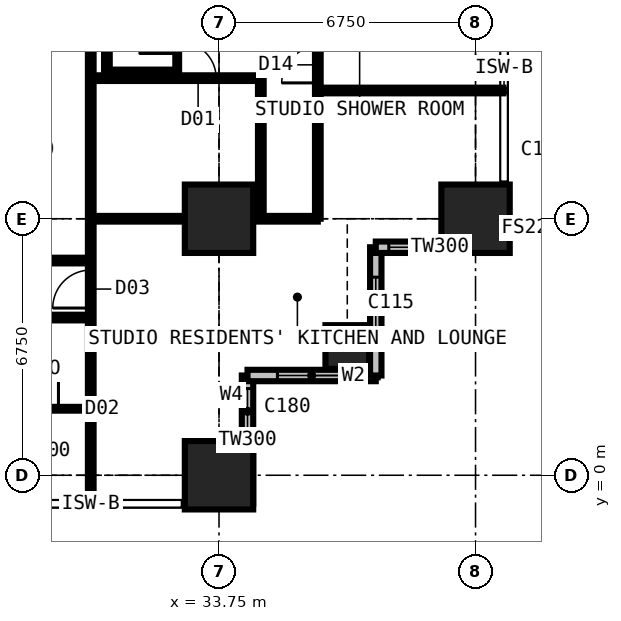
"""IFC4 building model, lengths in metres.
Left out: names, types, materials, properties, quantities, classifications, styles, units other than length and angle.
Written with IfcOpenShell. Run it as: python <this file> out.ifc"""

import sys

from ifc_helpers import new_model, si_unit, direction, frame, frame_2d, origin, origin_2d, place, context, subcontext, project, spatial, rectangle, extrude, element, fill, save


model = new_model("IFC4")
c1 = context("Model", 3, precision=1e-05, world=origin(), true_north=direction((0.0, 1.0)))
c2 = subcontext(c1, "Body", "Model", "MODEL_VIEW")
j1 = project(units=[si_unit("LENGTHUNIT", "METRE"), si_unit("PLANEANGLEUNIT", "RADIAN")], contexts=[c1])
p1 = place(None, origin())
s1 = spatial("IfcSite", under=j1, at=p1, CompositionType="ELEMENT")
p2 = place(p1, origin())
s2 = spatial("IfcBuilding", under=s1, at=p2, CompositionType="ELEMENT")
p3 = place(p2, frame((0.0, 0.0, 98.1)))
s3 = spatial("IfcBuildingStorey", under=s2, at=p3, CompositionType="ELEMENT", Elevation=98.1)
for number, where, z_axis, x_axis in (
    (1, (33.75, 0.0, 0.0), (0.0, 0.0, 1.0), (1.0, 0.0, 0.0)),
    (2, (33.75, 6.75, 0.0), (0.0, 0.0, 1.0), (1.0, 0.0, 0.0)),
):
    element("IfcColumn", number, at=place(p3, frame(where, z_axis=z_axis, x_axis=x_axis)), inside=s3, PredefinedType="COLUMN", context=c2, shape_type="SweptSolid", body=[
        extrude(rectangle(XDim=1.8, YDim=1.8, at=origin_2d()), origin(), (0.0, 0.0, 1.0), 3.6),
    ])
p4 = place(p3, frame((37.125, 3.375, 0.0), z_axis=(0.0, 0.0, 1.0), x_axis=(1.0, 0.0, 0.0)))
e3 = element("IfcColumn", 3, at=p4, inside=s3, PredefinedType="COLUMN", context=c2, shape_type="SweptSolid", body=[
    extrude(rectangle(XDim=1.15, YDim=1.15, at=origin_2d()), origin(), (0.0, 0.0, 1.0), 3.6),
])
p5 = place(p3, frame((40.5, 6.75, 0.0), z_axis=(0.0, 0.0, 1.0), x_axis=(1.0, 0.0, 0.0)))
e4 = element("IfcColumn", 4, at=p5, inside=s3, PredefinedType="COLUMN", context=c2, shape_type="SweptSolid", body=[
    extrude(rectangle(XDim=1.8, YDim=1.8, at=origin_2d()), origin(), (0.0, 0.0, 1.0), 3.6),
])
p6 = place(p3, frame((34.5, -0.75, 0.0), z_axis=(0.0, 0.0, 1.0), x_axis=(0.0, 1.0, 0.0)))
e5 = element("IfcWall", 5, at=p6, inside=s3, PredefinedType="SOLIDWALL", context=c2, shape_type="SweptSolid", body=[
    extrude(rectangle(XDim=3.375, YDim=0.3, at=frame_2d((1.688, 0.0))), origin(), (0.0, 0.0, 1.0), 3.375),
])
p7 = place(p6, frame((1.833, 0.0, 0.9)))
e6 = element("IfcOpeningElement", 6, at=p7, cuts=e5, PredefinedType="OPENING", context=c2, shape_type="SweptSolid", body=[
    extrude(rectangle(XDim=1.2, YDim=1.8, at=frame_2d((0.6, 0.9))), frame((0.0, 0.16, 0.0), z_axis=(0.0, -1.0, 0.0), x_axis=(1.0, 0.0, 0.0)), (0.0, 0.0, 1.0), 0.32),
])
p8 = place(p3, frame((34.5, 2.625, 0.0), z_axis=(0.0, 0.0, 1.0), x_axis=(1.0, 0.0, 0.0)))
e7 = element("IfcWall", 7, at=p8, inside=s3, PredefinedType="SOLIDWALL", context=c2, shape_type="SweptSolid", body=[
    extrude(rectangle(XDim=3.375, YDim=0.3, at=frame_2d((1.688, 0.0))), origin(), (0.0, 0.0, 1.0), 3.375),
])
p9 = place(p8, frame((0.788, 0.0, 0.6)))
e8 = element("IfcOpeningElement", 8, at=p9, cuts=e7, PredefinedType="OPENING", context=c2, shape_type="SweptSolid", body=[
    extrude(rectangle(XDim=1.8, YDim=2.1, at=frame_2d((0.9, 1.05))), frame((0.0, 0.16, 0.0), z_axis=(0.0, -1.0, 0.0), x_axis=(1.0, 0.0, 0.0)), (0.0, 0.0, 1.0), 0.32),
])
p10 = place(p3, frame((37.875, 2.625, 0.0), z_axis=(0.0, 0.0, 1.0), x_axis=(0.0, 1.0, 0.0)))
e9 = element("IfcWall", 9, at=p10, inside=s3, PredefinedType="SOLIDWALL", context=c2, shape_type="SweptSolid", body=[
    extrude(rectangle(XDim=3.375, YDim=0.3, at=frame_2d((1.688, 0.0))), origin(), (0.0, 0.0, 1.0), 3.375),
])
p11 = place(p10, frame((0.788, 0.0, 0.6)))
e10 = element("IfcOpeningElement", 10, at=p11, cuts=e9, PredefinedType="OPENING", context=c2, shape_type="SweptSolid", body=[
    extrude(rectangle(XDim=1.8, YDim=2.1, at=frame_2d((0.9, 1.05))), frame((0.0, 0.16, 0.0), z_axis=(0.0, -1.0, 0.0), x_axis=(1.0, 0.0, 0.0)), (0.0, 0.0, 1.0), 0.32),
])
p12 = place(p3, frame((37.875, 6.0, 0.0), z_axis=(0.0, 0.0, 1.0), x_axis=(1.0, 0.0, 0.0)))
e11 = element("IfcWall", 11, at=p12, inside=s3, PredefinedType="SOLIDWALL", context=c2, shape_type="SweptSolid", body=[
    extrude(rectangle(XDim=3.375, YDim=0.3, at=frame_2d((1.688, 0.0))), origin(), (0.0, 0.0, 1.0), 3.375),
])
p13 = place(p12, frame((0.343, 0.0, 0.9)))
e12 = element("IfcOpeningElement", 12, at=p13, cuts=e11, PredefinedType="OPENING", context=c2, shape_type="SweptSolid", body=[
    extrude(rectangle(XDim=1.2, YDim=1.8, at=frame_2d((0.6, 0.9))), frame((0.0, 0.16, 0.0), z_axis=(0.0, -1.0, 0.0), x_axis=(1.0, 0.0, 0.0)), (0.0, 0.0, 1.0), 0.32),
])
p14 = place(p3, frame((6.75, 4.15, 0.0), z_axis=(0.0, 0.0, 1.0), x_axis=(1.0, 0.0, 0.0)))
e13 = element("IfcWall", 13, at=p14, inside=s3, PredefinedType="PARTITIONING", context=c2, shape_type="SweptSolid", body=[
    extrude(rectangle(XDim=23.625, YDim=0.15, at=frame_2d((11.812, 0.0))), origin(), (0.0, 0.0, 1.0), 3.375),
])
p15 = place(p14, frame((1.2, 0.0, 0.0)))
e14 = element("IfcOpeningElement", 14, at=p15, cuts=e13, PredefinedType="OPENING", context=c2, shape_type="SweptSolid", body=[
    extrude(rectangle(XDim=1.0, YDim=2.2, at=frame_2d((0.5, 1.1))), frame((0.0, 0.085, 0.0), z_axis=(0.0, -1.0, 0.0), x_axis=(1.0, 0.0, 0.0)), (0.0, 0.0, 1.0), 0.17),
])
p16 = place(p14, frame((3.575, 0.0, 0.0)))
e15 = element("IfcOpeningElement", 15, at=p16, cuts=e13, PredefinedType="OPENING", context=c2, shape_type="SweptSolid", body=[
    extrude(rectangle(XDim=0.95, YDim=2.2, at=frame_2d((0.475, 1.1))), frame((0.0, 0.085, 0.0), z_axis=(0.0, -1.0, 0.0), x_axis=(1.0, 0.0, 0.0)), (0.0, 0.0, 1.0), 0.17),
])
p17 = place(p14, frame((7.0, 0.0, 0.0)))
e16 = element("IfcOpeningElement", 16, at=p17, cuts=e13, PredefinedType="OPENING", context=c2, shape_type="SweptSolid", body=[
    extrude(rectangle(XDim=0.95, YDim=2.2, at=frame_2d((0.475, 1.1))), frame((0.0, 0.085, 0.0), z_axis=(0.0, -1.0, 0.0), x_axis=(1.0, 0.0, 0.0)), (0.0, 0.0, 1.0), 0.17),
])
p18 = place(p14, frame((18.475, 0.0, 0.0)))
e17 = element("IfcOpeningElement", 17, at=p18, cuts=e13, PredefinedType="OPENING", context=c2, shape_type="SweptSolid", body=[
    extrude(rectangle(XDim=0.95, YDim=2.2, at=frame_2d((0.475, 1.1))), frame((0.0, 0.085, 0.0), z_axis=(0.0, -1.0, 0.0), x_axis=(1.0, 0.0, 0.0)), (0.0, 0.0, 1.0), 0.17),
])
p19 = place(p14, frame((11.725, 0.0, 0.0)))
e18 = element("IfcOpeningElement", 18, at=p19, cuts=e13, PredefinedType="OPENING", context=c2, shape_type="SweptSolid", body=[
    extrude(rectangle(XDim=0.95, YDim=2.2, at=frame_2d((0.475, 1.1))), frame((0.0, 0.085, 0.0), z_axis=(0.0, -1.0, 0.0), x_axis=(1.0, 0.0, 0.0)), (0.0, 0.0, 1.0), 0.17),
])
p20 = place(p3, frame((22.988, 5.65, 0.0), z_axis=(0.0, 0.0, 1.0), x_axis=(1.0, 0.0, 0.0)))
e19 = element("IfcWall", 19, at=p20, inside=s3, PredefinedType="PARTITIONING", context=c2, shape_type="SweptSolid", body=[
    extrude(rectangle(XDim=7.387, YDim=0.15, at=frame_2d((3.694, 0.0))), origin(), (0.0, 0.0, 1.0), 3.375),
])
p21 = place(p20, frame((2.15, 0.0, 0.0)))
e20 = element("IfcOpeningElement", 20, at=p21, cuts=e19, PredefinedType="OPENING", context=c2, shape_type="SweptSolid", body=[
    extrude(rectangle(XDim=0.95, YDim=2.2, at=frame_2d((0.475, 1.1))), frame((0.0, 0.085, 0.0), z_axis=(0.0, -1.0, 0.0), x_axis=(1.0, 0.0, 0.0)), (0.0, 0.0, 1.0), 0.17),
])
p22 = place(p3, frame((27.775, 1.75, 0.0), z_axis=(0.0, 0.0, 1.0), x_axis=(1.0, 0.0, 0.0)))
e21 = element("IfcWall", 21, at=p22, inside=s3, PredefinedType="PARTITIONING", context=c2, shape_type="SweptSolid", body=[
    extrude(rectangle(XDim=2.6, YDim=0.1, at=frame_2d((1.3, 0.0))), origin(), (0.0, 0.0, 1.0), 3.375),
])
p23 = place(p22, frame((0.85, 0.0, 0.0)))
e22 = element("IfcOpeningElement", 22, at=p23, cuts=e21, PredefinedType="OPENING", context=c2, shape_type="SweptSolid", body=[
    extrude(rectangle(XDim=0.9, YDim=2.2, at=frame_2d((0.45, 1.1))), frame((0.0, 0.06, 0.0), z_axis=(0.0, -1.0, 0.0), x_axis=(1.0, 0.0, 0.0)), (0.0, 0.0, 1.0), 0.12),
])
p24 = place(p3, frame((30.375, -0.734, 0.0), z_axis=(0.0, 0.0, 1.0), x_axis=(0.0, 1.0, 0.0)))
e23 = element("IfcWall", 23, at=p24, inside=s3, PredefinedType="PARTITIONING", context=c2, shape_type="SweptSolid", body=[
    extrude(rectangle(XDim=12.034, YDim=0.15, at=frame_2d((6.017, 0.0))), origin(), (0.0, 0.0, 1.0), 3.375),
])
p25 = place(p24, frame((5.134, 0.0, 0.0)))
e24 = element("IfcOpeningElement", 24, at=p25, cuts=e23, PredefinedType="OPENING", context=c2, shape_type="SweptSolid", body=[
    extrude(rectangle(XDim=1.0, YDim=2.2, at=frame_2d((0.5, 1.1))), frame((0.0, 0.085, 0.0), z_axis=(0.0, -1.0, 0.0), x_axis=(1.0, 0.0, 0.0)), (0.0, 0.0, 1.0), 0.17),
])
p26 = place(p3, frame((30.375, 6.75, 0.0), z_axis=(0.0, 0.0, 1.0), x_axis=(1.0, 0.0, 0.0)))
e25 = element("IfcWall", 25, at=p26, inside=s3, PredefinedType="PARTITIONING", context=c2, shape_type="SweptSolid", body=[
    extrude(rectangle(XDim=5.975, YDim=0.15, at=frame_2d((2.988, 0.0))), origin(), (0.0, 0.0, 1.0), 2.877),
])
p27 = place(p3, frame((30.375, 10.45, 0.0), z_axis=(0.0, 0.0, 1.0), x_axis=(1.0, 0.0, 0.0)))
e26 = element("IfcWall", 26, at=p27, inside=s3, PredefinedType="PARTITIONING", context=c2, shape_type="SweptSolid", body=[
    extrude(rectangle(XDim=4.475, YDim=0.15, at=frame_2d((2.238, 0.0))), origin(), (0.0, 0.0, 1.0), 3.375),
])
p28 = place(p27, frame((2.35, 0.0, 0.0)))
e27 = element("IfcOpeningElement", 27, at=p28, cuts=e26, PredefinedType="OPENING", context=c2, shape_type="SweptSolid", body=[
    extrude(rectangle(XDim=0.95, YDim=2.2, at=frame_2d((0.475, 1.1))), frame((0.0, 0.085, 0.0), z_axis=(0.0, -1.0, 0.0), x_axis=(1.0, 0.0, 0.0)), (0.0, 0.0, 1.0), 0.17),
])
p29 = place(p3, frame((30.8, 10.6, 0.0), z_axis=(0.0, 0.0, 1.0), x_axis=(0.0, 1.0, 0.0)))
e28 = element("IfcWall", 28, at=p29, inside=s3, PredefinedType="PARTITIONING", context=c2, shape_type="SweptSolid", body=[
    extrude(rectangle(XDim=0.7, YDim=0.15, at=frame_2d((0.35, 0.0))), origin(), (0.0, 0.0, 1.0), 3.375),
])
p30 = place(p3, frame((30.8, 10.6, 0.0), z_axis=(0.0, 0.0, 1.0), x_axis=(1.0, 0.0, 0.0)))
e29 = element("IfcWall", 29, at=p30, inside=s3, PredefinedType="PARTITIONING", context=c2, shape_type="SweptSolid", body=[
    extrude(rectangle(XDim=1.85, YDim=0.15, at=frame_2d((0.925, 0.0))), origin(), (0.0, 0.0, 1.0), 3.375),
])
p31 = place(p3, frame((32.65, 10.6, 0.0), z_axis=(0.0, 0.0, 1.0), x_axis=(0.0, 1.0, 0.0)))
e30 = element("IfcWall", 30, at=p31, inside=s3, PredefinedType="SHEAR", context=c2, shape_type="SweptSolid", body=[
    extrude(rectangle(XDim=9.3, YDim=0.1, at=frame_2d((4.65, 0.0))), origin(), (0.0, 0.0, 1.0), 3.375),
])
p32 = place(p31, frame((0.5, 0.0, 0.0)))
e31 = element("IfcOpeningElement", 31, at=p32, cuts=e30, PredefinedType="OPENING", context=c2, shape_type="SweptSolid", body=[
    extrude(rectangle(XDim=1.0, YDim=2.2, at=frame_2d((0.5, 1.1))), frame((0.0, 0.06, 0.0), z_axis=(0.0, -1.0, 0.0), x_axis=(1.0, 0.0, 0.0)), (0.0, 0.0, 1.0), 0.12),
])
p33 = place(p3, frame((34.85, 6.75, 0.0), z_axis=(0.0, 0.0, 1.0), x_axis=(0.0, 1.0, 0.0)))
e32 = element("IfcWall", 32, at=p33, inside=s3, PredefinedType="PARTITIONING", context=c2, shape_type="SweptSolid", body=[
    extrude(rectangle(XDim=3.7, YDim=0.15, at=frame_2d((1.85, 0.0))), origin(), (0.0, 0.0, 1.0), 3.375),
])
p34 = place(p3, frame((36.35, 6.75, 0.0), z_axis=(0.0, 0.0, 1.0), x_axis=(0.0, 1.0, 0.0)))
e33 = element("IfcWall", 33, at=p34, inside=s3, PredefinedType="PARTITIONING", context=c2, shape_type="SweptSolid", body=[
    extrude(rectangle(XDim=20.25, YDim=0.15, at=frame_2d((10.125, 0.0))), origin(), (0.0, 0.0, 1.0), 3.375),
])
p35 = place(p34, frame((3.575, 0.0, 0.0)))
e34 = element("IfcOpeningElement", 34, at=p35, cuts=e33, PredefinedType="OPENING", context=c2, shape_type="SweptSolid", body=[
    extrude(rectangle(XDim=0.95, YDim=2.2, at=frame_2d((0.475, 1.1))), frame((0.0, 0.085, 0.0), z_axis=(0.0, -1.0, 0.0), x_axis=(1.0, 0.0, 0.0)), (0.0, 0.0, 1.0), 0.17),
])
p36 = place(p34, frame((7.0, 0.0, 0.0)))
e35 = element("IfcOpeningElement", 35, at=p36, cuts=e33, PredefinedType="OPENING", context=c2, shape_type="SweptSolid", body=[
    extrude(rectangle(XDim=0.95, YDim=2.2, at=frame_2d((0.475, 1.1))), frame((0.0, 0.085, 0.0), z_axis=(0.0, -1.0, 0.0), x_axis=(1.0, 0.0, 0.0)), (0.0, 0.0, 1.0), 0.17),
])
p37 = place(p34, frame((10.375, 0.0, 0.0)))
e36 = element("IfcOpeningElement", 36, at=p37, cuts=e33, PredefinedType="OPENING", context=c2, shape_type="SweptSolid", body=[
    extrude(rectangle(XDim=0.95, YDim=2.2, at=frame_2d((0.475, 1.1))), frame((0.0, 0.085, 0.0), z_axis=(0.0, -1.0, 0.0), x_axis=(1.0, 0.0, 0.0)), (0.0, 0.0, 1.0), 0.17),
])
p38 = place(p34, frame((13.75, 0.0, 0.0)))
e37 = element("IfcOpeningElement", 37, at=p38, cuts=e33, PredefinedType="OPENING", context=c2, shape_type="SweptSolid", body=[
    extrude(rectangle(XDim=0.95, YDim=2.2, at=frame_2d((0.475, 1.1))), frame((0.0, 0.085, 0.0), z_axis=(0.0, -1.0, 0.0), x_axis=(1.0, 0.0, 0.0)), (0.0, 0.0, 1.0), 0.17),
])
p39 = place(p34, frame((17.125, 0.0, 0.0)))
e38 = element("IfcOpeningElement", 38, at=p39, cuts=e33, PredefinedType="OPENING", context=c2, shape_type="SweptSolid", body=[
    extrude(rectangle(XDim=0.95, YDim=2.2, at=frame_2d((0.475, 1.1))), frame((0.0, 0.085, 0.0), z_axis=(0.0, -1.0, 0.0), x_axis=(1.0, 0.0, 0.0)), (0.0, 0.0, 1.0), 0.17),
])
p40 = place(p3, frame((36.35, 10.125, 0.0), z_axis=(0.0, 0.0, 1.0), x_axis=(1.0, 0.0, 0.0)))
e39 = element("IfcWall", 39, at=p40, inside=s3, PredefinedType="PARTITIONING", context=c2, shape_type="SweptSolid", body=[
    extrude(rectangle(XDim=4.884, YDim=0.15, at=frame_2d((2.442, 0.0))), origin(), (0.0, 0.0, 1.0), 3.375),
])
p41 = place(p7, origin())
e40 = element("IfcWindow", 40, at=p41, inside=s3, PartitioningType="SINGLE_PANEL", PredefinedType="WINDOW", context=c2, shape_type="SweptSolid", body=[
    extrude(rectangle(XDim=1.2, YDim=1.8, at=frame_2d((0.6, 0.9))), frame((0.0, 0.03, 0.0), z_axis=(0.0, -1.0, 0.0), x_axis=(1.0, 0.0, 0.0)), (0.0, 0.0, 1.0), 0.06),
])
fill(e6, e40)
p42 = place(p9, origin())
e41 = element("IfcWindow", 41, at=p42, inside=s3, PartitioningType="SINGLE_PANEL", PredefinedType="WINDOW", context=c2, shape_type="SweptSolid", body=[
    extrude(rectangle(XDim=1.8, YDim=2.1, at=frame_2d((0.9, 1.05))), frame((0.0, 0.03, 0.0), z_axis=(0.0, -1.0, 0.0), x_axis=(1.0, 0.0, 0.0)), (0.0, 0.0, 1.0), 0.06),
])
fill(e8, e41)
p43 = place(p11, origin())
e42 = element("IfcWindow", 42, at=p43, inside=s3, PartitioningType="SINGLE_PANEL", PredefinedType="WINDOW", context=c2, shape_type="SweptSolid", body=[
    extrude(rectangle(XDim=1.8, YDim=2.1, at=frame_2d((0.9, 1.05))), frame((0.0, 0.03, 0.0), z_axis=(0.0, -1.0, 0.0), x_axis=(1.0, 0.0, 0.0)), (0.0, 0.0, 1.0), 0.06),
])
fill(e10, e42)
p44 = place(p13, origin())
e43 = element("IfcWindow", 43, at=p44, inside=s3, PartitioningType="SINGLE_PANEL", PredefinedType="WINDOW", context=c2, shape_type="SweptSolid", body=[
    extrude(rectangle(XDim=1.2, YDim=1.8, at=frame_2d((0.6, 0.9))), frame((0.0, 0.03, 0.0), z_axis=(0.0, -1.0, 0.0), x_axis=(1.0, 0.0, 0.0)), (0.0, 0.0, 1.0), 0.06),
])
fill(e12, e43)
p45 = place(p23, origin())
e44 = element("IfcDoor", 44, at=p45, inside=s3, OperationType="SINGLE_SWING_RIGHT", PredefinedType="DOOR", context=c2, shape_type="SweptSolid", body=[
    extrude(rectangle(XDim=0.9, YDim=2.2, at=frame_2d((0.45, 1.1))), frame((0.0, 0.025, 0.0), z_axis=(0.0, -1.0, 0.0), x_axis=(1.0, 0.0, 0.0)), (0.0, 0.0, 1.0), 0.05),
])
fill(e22, e44)
p46 = place(p25, origin())
e45 = element("IfcDoor", 45, at=p46, inside=s3, OperationType="SINGLE_SWING_LEFT", PredefinedType="DOOR", context=c2, shape_type="SweptSolid", body=[
    extrude(rectangle(XDim=1.0, YDim=2.2, at=frame_2d((0.5, 1.1))), frame((0.0, 0.025, 0.0), z_axis=(0.0, -1.0, 0.0), x_axis=(1.0, 0.0, 0.0)), (0.0, 0.0, 1.0), 0.05),
])
fill(e24, e45)
p47 = place(p35, origin())
e46 = element("IfcDoor", 46, at=p47, inside=s3, OperationType="SINGLE_SWING_LEFT", PredefinedType="DOOR", context=c2, shape_type="SweptSolid", body=[
    extrude(rectangle(XDim=0.95, YDim=2.2, at=frame_2d((0.475, 1.1))), frame((0.0, 0.025, 0.0), z_axis=(0.0, -1.0, 0.0), x_axis=(1.0, 0.0, 0.0)), (0.0, 0.0, 1.0), 0.05),
])
fill(e34, e46)
p48 = place(p32, origin())
e47 = element("IfcDoor", 47, at=p48, inside=s3, OperationType="SINGLE_SWING_LEFT", PredefinedType="DOOR", context=c2, shape_type="SweptSolid", body=[
    extrude(rectangle(XDim=1.0, YDim=2.2, at=frame_2d((0.5, 1.1))), frame((0.0, 0.025, 0.0), z_axis=(0.0, -1.0, 0.0), x_axis=(1.0, 0.0, 0.0)), (0.0, 0.0, 1.0), 0.05),
])
fill(e31, e47)
p49 = place(p28, origin())
e48 = element("IfcDoor", 48, at=p49, inside=s3, OperationType="SINGLE_SWING_LEFT", PredefinedType="DOOR", context=c2, shape_type="SweptSolid", body=[
    extrude(rectangle(XDim=0.95, YDim=2.2, at=frame_2d((0.475, 1.1))), frame((0.0, 0.025, 0.0), z_axis=(0.0, -1.0, 0.0), x_axis=(1.0, 0.0, 0.0)), (0.0, 0.0, 1.0), 0.05),
])
fill(e27, e48)
save(model, sys.argv[1])
